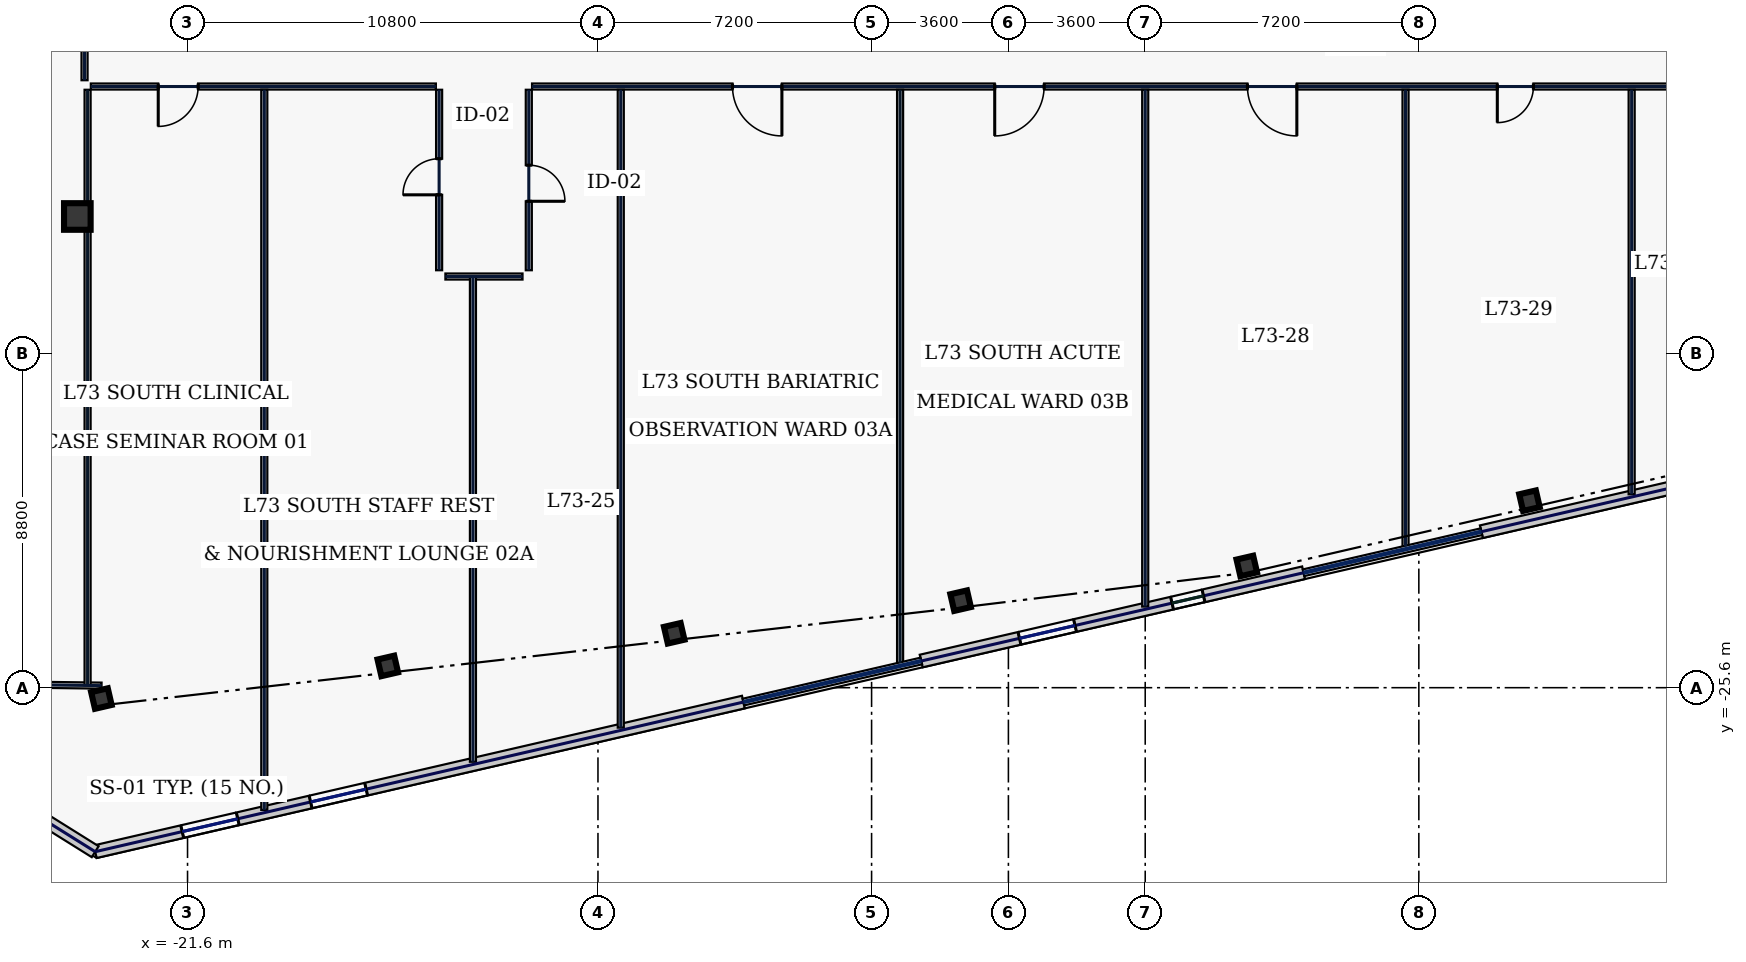
"""IFC4 building model, lengths in metres.
Left out: names, types, materials, properties, quantities, classifications, styles, units other than length and angle.
Written with IfcOpenShell. Run it as: python <this file> out.ifc"""

import sys

from ifc_helpers import new_model, si_unit, direction, frame, frame_2d, origin, origin_2d, place, context, subcontext, project, spatial, rectangle, hollow_rectangle, extrude, element, fill, save


model = new_model("IFC4")
c1 = context("Model", 3, precision=1e-05, world=origin(), true_north=direction((0.0, 1.0)))
c2 = subcontext(c1, "Body", "Model", "MODEL_VIEW")
j1 = project(units=[si_unit("LENGTHUNIT", "METRE"), si_unit("PLANEANGLEUNIT", "RADIAN")], contexts=[c1])
p1 = place(None, origin())
s1 = spatial("IfcSite", under=j1, at=p1, CompositionType="ELEMENT")
p2 = place(p1, origin())
s2 = spatial("IfcBuilding", under=s1, at=p2, CompositionType="ELEMENT")
p3 = place(p2, frame((0.0, 0.0, 313.0)))
s3 = spatial("IfcBuildingStorey", under=s2, at=p3, CompositionType="ELEMENT", Elevation=313.0)
p4 = place(p3, frame((-24.5, -13.2, 0.0), z_axis=(0.0, 0.0, 1.0), x_axis=(1.0, 0.0, 0.0)))
e1 = element("IfcColumn", 1, at=p4, inside=s3, PredefinedType="COLUMN", context=c2, shape_type="SweptSolid", body=[
    extrude(hollow_rectangle(XDim=0.7, YDim=0.7, WallThickness=0.032, at=origin_2d()), origin(), (0.0, 0.0, 1.0), 3.74),
])
for number, where, z_axis, x_axis in (
    (2, (-23.867, -25.886, 0.0), (0.0, 0.0, 1.0), (0.974, 0.225, 0.0)),
    (3, (-16.33, -25.027, 0.0), (0.0, 0.0, 1.0), (0.974, 0.225, 0.0)),
    (4, (-8.794, -24.168, 0.0), (0.0, 0.0, 1.0), (0.974, 0.225, 0.0)),
    (5, (-1.258, -23.31, 0.0), (0.0, 0.0, 1.0), (0.974, 0.225, 0.0)),
    (6, (6.273, -22.397, 0.0), (0.0, 0.0, 1.0), (0.974, 0.225, 0.0)),
    (7, (13.711, -20.68, 0.0), (0.0, 0.0, 1.0), (0.974, 0.225, 0.0)),
):
    element("IfcColumn", number, at=place(p3, frame(where, z_axis=z_axis, x_axis=x_axis)), inside=s3, PredefinedType="COLUMN", context=c2, shape_type="SweptSolid", body=[
        extrude(hollow_rectangle(XDim=0.45, YDim=0.45, WallThickness=0.022, at=origin_2d()), origin(), (0.0, 0.0, 1.0), 3.74),
    ])
p5 = place(p3, frame((-24.03, -29.916, 0.0), z_axis=(0.0, 0.0, 1.0), x_axis=(0.974370978061, 0.224947098473, 0.0)))
e8 = element("IfcWall", 8, at=p5, inside=s3, PredefinedType="STANDARD", context=c2, shape_type="SweptSolid", body=[
    extrude(rectangle(XDim=17.506, YDim=0.34, at=frame_2d((8.753, 0.0))), origin(), (0.0, 0.0, 1.0), 3.74),
])
p6 = place(p5, frame((2.35, 0.0, 0.9)))
e9 = element("IfcOpeningElement", 9, at=p6, cuts=e8, PredefinedType="OPENING", context=c2, shape_type="SweptSolid", body=[
    extrude(rectangle(XDim=1.5, YDim=2.0, at=frame_2d((0.75, 1.0))), frame((0.0, 0.18, 0.0), z_axis=(0.0, -1.0, 0.0), x_axis=(1.0, 0.0, 0.0)), (0.0, 0.0, 1.0), 0.36),
])
p7 = place(p5, frame((5.817, 0.0, 0.9)))
e10 = element("IfcOpeningElement", 10, at=p7, cuts=e8, PredefinedType="OPENING", context=c2, shape_type="SweptSolid", body=[
    extrude(rectangle(XDim=1.5, YDim=2.0, at=frame_2d((0.75, 1.0))), frame((0.0, 0.18, 0.0), z_axis=(0.0, -1.0, 0.0), x_axis=(1.0, 0.0, 0.0)), (0.0, 0.0, 1.0), 0.36),
])
p8 = place(p3, frame((-2.295, -24.898, 0.0), z_axis=(0.0, 0.0, 1.0), x_axis=(0.974370872906, 0.224947553958, 0.0)))
e11 = element("IfcWall", 11, at=p8, inside=s3, PredefinedType="STANDARD", context=c2, shape_type="SweptSolid", body=[
    extrude(rectangle(XDim=10.328, YDim=0.34, at=frame_2d((5.164, 0.0))), origin(), (0.0, 0.0, 1.0), 3.74),
])
p9 = place(p8, frame((2.655, 0.0, 0.9)))
e12 = element("IfcOpeningElement", 12, at=p9, cuts=e11, PredefinedType="OPENING", context=c2, shape_type="SweptSolid", body=[
    extrude(rectangle(XDim=1.5, YDim=2.0, at=frame_2d((0.75, 1.0))), frame((0.0, 0.18, 0.0), z_axis=(0.0, -1.0, 0.0), x_axis=(1.0, 0.0, 0.0)), (0.0, 0.0, 1.0), 0.36),
])
p10 = place(p8, frame((6.774, 0.0, 0.9)))
e13 = element("IfcOpeningElement", 13, at=p10, cuts=e11, PredefinedType="OPENING", context=c2, shape_type="SweptSolid", body=[
    extrude(rectangle(XDim=0.85, YDim=1.85, at=frame_2d((0.425, 0.925))), frame((0.0, 0.18, 0.0), z_axis=(0.0, -1.0, 0.0), x_axis=(1.0, 0.0, 0.0)), (0.0, 0.0, 1.0), 0.36),
])
p11 = place(p3, frame((12.445, -21.495, 0.0), z_axis=(0.0, 0.0, 1.0), x_axis=(0.974369392164, 0.224953967767, 0.0)))
e14 = element("IfcWall", 14, at=p11, inside=s3, PredefinedType="STANDARD", context=c2, shape_type="SweptSolid", body=[
    extrude(rectangle(XDim=17.366, YDim=0.34, at=frame_2d((8.683, 0.0))), origin(), (0.0, 0.0, 1.0), 3.74),
])
p12 = place(p11, frame((6.24, 0.0, 0.9)))
e15 = element("IfcOpeningElement", 15, at=p12, cuts=e14, PredefinedType="OPENING", context=c2, shape_type="SweptSolid", body=[
    extrude(rectangle(XDim=1.5, YDim=2.0, at=frame_2d((0.75, 1.0))), frame((0.0, 0.18, 0.0), z_axis=(0.0, -1.0, 0.0), x_axis=(1.0, 0.0, 0.0)), (0.0, 0.0, 1.0), 0.36),
])
p13 = place(p11, frame((10.363, 0.0, 0.9)))
e16 = element("IfcOpeningElement", 16, at=p13, cuts=e14, PredefinedType="OPENING", context=c2, shape_type="SweptSolid", body=[
    extrude(rectangle(XDim=0.85, YDim=1.85, at=frame_2d((0.425, 0.925))), frame((0.0, 0.18, 0.0), z_axis=(0.0, -1.0, 0.0), x_axis=(1.0, 0.0, 0.0)), (0.0, 0.0, 1.0), 0.36),
])
p14 = place(p11, frame((13.875, 0.0, 0.9)))
e17 = element("IfcOpeningElement", 17, at=p14, cuts=e14, PredefinedType="OPENING", context=c2, shape_type="SweptSolid", body=[
    extrude(rectangle(XDim=1.5, YDim=2.0, at=frame_2d((0.75, 1.0))), frame((0.0, 0.18, 0.0), z_axis=(0.0, -1.0, 0.0), x_axis=(1.0, 0.0, 0.0)), (0.0, 0.0, 1.0), 0.36),
])
p15 = place(p3, frame((-29.343, -26.596, 0.0), z_axis=(0.0, 0.0, 1.0), x_axis=(0.848037708252, -0.529935887993, 0.0)))
e18 = element("IfcWall", 18, at=p15, inside=s3, PredefinedType="STANDARD", context=c2, shape_type="SweptSolid", body=[
    extrude(rectangle(XDim=6.265, YDim=0.34, at=frame_2d((3.133, 0.0))), origin(), (0.0, 0.0, 1.0), 3.74),
])
p16 = place(p3, frame((-28.994, -25.479, 0.0), z_axis=(0.0, 0.0, 1.0), x_axis=(0.999915052546, -0.01303409726, 0.0)))
e19 = element("IfcWall", 19, at=p16, inside=s3, PredefinedType="PARTITIONING", context=c2, shape_type="SweptSolid", body=[
    extrude(rectangle(XDim=5.132, YDim=0.16, at=frame_2d((2.566, 0.0))), origin(), (0.0, 0.0, 1.0), 3.74),
])
p17 = place(p3, frame((-24.31, -9.615, 0.0), z_axis=(0.0, 0.0, 1.0), x_axis=(0.0, 1.0, 0.0)))
e20 = element("IfcWall", 20, at=p17, inside=s3, PredefinedType="PARTITIONING", context=c2, shape_type="SweptSolid", body=[
    extrude(rectangle(XDim=19.28, YDim=0.16, at=frame_2d((9.64, 0.0))), origin(), (0.0, 0.0, 1.0), 3.74),
])
p18 = place(p17, frame((1.969, 0.0, 0.0)))
e21 = element("IfcOpeningElement", 21, at=p18, cuts=e20, PredefinedType="OPENING", context=c2, shape_type="SweptSolid", body=[
    extrude(rectangle(XDim=0.95, YDim=2.2, at=frame_2d((0.475, 1.1))), frame((0.0, 0.09, 0.0), z_axis=(0.0, -1.0, 0.0), x_axis=(1.0, 0.0, 0.0)), (0.0, 0.0, 1.0), 0.18),
])
p19 = place(p17, frame((7.25, 0.0, 0.0)))
e22 = element("IfcOpeningElement", 22, at=p19, cuts=e20, PredefinedType="OPENING", context=c2, shape_type="SweptSolid", body=[
    extrude(rectangle(XDim=0.95, YDim=2.2, at=frame_2d((0.475, 1.1))), frame((0.0, 0.09, 0.0), z_axis=(0.0, -1.0, 0.0), x_axis=(1.0, 0.0, 0.0)), (0.0, 0.0, 1.0), 0.18),
])
p20 = place(p17, frame((12.45, 0.0, 0.0)))
e23 = element("IfcOpeningElement", 23, at=p20, cuts=e20, PredefinedType="OPENING", context=c2, shape_type="SweptSolid", body=[
    extrude(rectangle(XDim=0.95, YDim=2.2, at=frame_2d((0.475, 1.1))), frame((0.0, 0.09, 0.0), z_axis=(0.0, -1.0, 0.0), x_axis=(1.0, 0.0, 0.0)), (0.0, 0.0, 1.0), 0.18),
])
p21 = place(p17, frame((16.506, 0.0, 0.0)))
e24 = element("IfcOpeningElement", 24, at=p21, cuts=e20, PredefinedType="OPENING", context=c2, shape_type="SweptSolid", body=[
    extrude(rectangle(XDim=0.95, YDim=2.2, at=frame_2d((0.475, 1.1))), frame((0.0, 0.09, 0.0), z_axis=(0.0, -1.0, 0.0), x_axis=(1.0, 0.0, 0.0)), (0.0, 0.0, 1.0), 0.18),
])
p22 = place(p3, frame((24.145, -9.78, 0.0), z_axis=(0.0, 0.0, 1.0), x_axis=(-1.0, 0.0, 0.0)))
e25 = element("IfcWall", 25, at=p22, inside=s3, PredefinedType="PARTITIONING", context=c2, shape_type="SweptSolid", body=[
    extrude(rectangle(XDim=36.68, YDim=0.16, at=frame_2d((18.34, 0.0))), origin(), (0.0, 0.0, 1.0), 3.74),
])
p23 = place(p22, frame((30.105, 0.0, 0.0)))
e26 = element("IfcOpeningElement", 26, at=p23, cuts=e25, PredefinedType="OPENING", context=c2, shape_type="SweptSolid", body=[
    extrude(rectangle(XDim=1.3, YDim=2.2, at=frame_2d((0.65, 1.1))), frame((0.0, 0.09, 0.0), z_axis=(0.0, -1.0, 0.0), x_axis=(1.0, 0.0, 0.0)), (0.0, 0.0, 1.0), 0.18),
])
p24 = place(p22, frame((23.205, 0.0, 0.0)))
e27 = element("IfcOpeningElement", 27, at=p24, cuts=e25, PredefinedType="OPENING", context=c2, shape_type="SweptSolid", body=[
    extrude(rectangle(XDim=1.3, YDim=2.2, at=frame_2d((0.65, 1.1))), frame((0.0, 0.09, 0.0), z_axis=(0.0, -1.0, 0.0), x_axis=(1.0, 0.0, 0.0)), (0.0, 0.0, 1.0), 0.18),
])
p25 = place(p22, frame((16.555, 0.0, 0.0)))
e28 = element("IfcOpeningElement", 28, at=p25, cuts=e25, PredefinedType="OPENING", context=c2, shape_type="SweptSolid", body=[
    extrude(rectangle(XDim=1.3, YDim=2.2, at=frame_2d((0.65, 1.1))), frame((0.0, 0.09, 0.0), z_axis=(0.0, -1.0, 0.0), x_axis=(1.0, 0.0, 0.0)), (0.0, 0.0, 1.0), 0.18),
])
p26 = place(p22, frame((10.33, 0.0, 0.0)))
e29 = element("IfcOpeningElement", 29, at=p26, cuts=e25, PredefinedType="OPENING", context=c2, shape_type="SweptSolid", body=[
    extrude(rectangle(XDim=0.95, YDim=2.2, at=frame_2d((0.475, 1.1))), frame((0.0, 0.09, 0.0), z_axis=(0.0, -1.0, 0.0), x_axis=(1.0, 0.0, 0.0)), (0.0, 0.0, 1.0), 0.18),
])
p27 = place(p22, frame((3.634, 0.0, 0.0)))
e30 = element("IfcOpeningElement", 30, at=p27, cuts=e25, PredefinedType="OPENING", context=c2, shape_type="SweptSolid", body=[
    extrude(rectangle(XDim=0.95, YDim=2.2, at=frame_2d((0.475, 1.1))), frame((0.0, 0.09, 0.0), z_axis=(0.0, -1.0, 0.0), x_axis=(1.0, 0.0, 0.0)), (0.0, 0.0, 1.0), 0.18),
])
p28 = place(p3, frame((-12.62, -9.865, 0.0), z_axis=(0.0, 0.0, 1.0), x_axis=(0.0, -1.0, 0.0)))
e31 = element("IfcWall", 31, at=p28, inside=s3, PredefinedType="PARTITIONING", context=c2, shape_type="SweptSolid", body=[
    extrude(rectangle(XDim=4.75, YDim=0.16, at=frame_2d((2.375, 0.0))), origin(), (0.0, 0.0, 1.0), 3.74),
])
p29 = place(p28, frame((1.985, 0.0, 0.0)))
e32 = element("IfcOpeningElement", 32, at=p29, cuts=e31, PredefinedType="OPENING", context=c2, shape_type="SweptSolid", body=[
    extrude(rectangle(XDim=0.95, YDim=2.2, at=frame_2d((0.475, 1.1))), frame((0.0, 0.09, 0.0), z_axis=(0.0, -1.0, 0.0), x_axis=(1.0, 0.0, 0.0)), (0.0, 0.0, 1.0), 0.18),
])
p30 = place(p3, frame((-12.785, -14.78, 0.0), z_axis=(0.0, 0.0, 1.0), x_axis=(-1.0, 0.0, 0.0)))
e33 = element("IfcWall", 33, at=p30, inside=s3, PredefinedType="PARTITIONING", context=c2, shape_type="SweptSolid", body=[
    extrude(rectangle(XDim=2.03, YDim=0.16, at=frame_2d((1.015, 0.0))), origin(), (0.0, 0.0, 1.0), 3.74),
])
p31 = place(p3, frame((-14.98, -14.615, 0.0), z_axis=(0.0, 0.0, 1.0), x_axis=(0.0, 1.0, 0.0)))
e34 = element("IfcWall", 34, at=p31, inside=s3, PredefinedType="PARTITIONING", context=c2, shape_type="SweptSolid", body=[
    extrude(rectangle(XDim=4.75, YDim=0.16, at=frame_2d((2.375, 0.0))), origin(), (0.0, 0.0, 1.0), 3.74),
])
p32 = place(p31, frame((1.985, 0.0, 0.0)))
e35 = element("IfcOpeningElement", 35, at=p32, cuts=e34, PredefinedType="OPENING", context=c2, shape_type="SweptSolid", body=[
    extrude(rectangle(XDim=0.95, YDim=2.2, at=frame_2d((0.475, 1.1))), frame((0.0, 0.09, 0.0), z_axis=(0.0, -1.0, 0.0), x_axis=(1.0, 0.0, 0.0)), (0.0, 0.0, 1.0), 0.18),
])
p33 = place(p3, frame((-15.065, -9.78, 0.0), z_axis=(0.0, 0.0, 1.0), x_axis=(-1.0, 0.0, 0.0)))
e36 = element("IfcWall", 36, at=p33, inside=s3, PredefinedType="PARTITIONING", context=c2, shape_type="SweptSolid", body=[
    extrude(rectangle(XDim=9.08, YDim=0.16, at=frame_2d((4.54, 0.0))), origin(), (0.0, 0.0, 1.0), 3.74),
])
p34 = place(p33, frame((6.256, 0.0, 0.0)))
e37 = element("IfcOpeningElement", 37, at=p34, cuts=e36, PredefinedType="OPENING", context=c2, shape_type="SweptSolid", body=[
    extrude(rectangle(XDim=1.05, YDim=2.2, at=frame_2d((0.525, 1.1))), frame((0.0, 0.09, 0.0), z_axis=(0.0, -1.0, 0.0), x_axis=(1.0, 0.0, 0.0)), (0.0, 0.0, 1.0), 0.18),
])
p35 = place(p3, frame((-24.23, -25.536, 0.0), z_axis=(0.0, 0.0, 1.0), x_axis=(0.0, 1.0, 0.0)))
e38 = element("IfcWall", 38, at=p35, inside=s3, PredefinedType="PARTITIONING", context=c2, shape_type="SweptSolid", body=[
    extrude(rectangle(XDim=15.671, YDim=0.16, at=frame_2d((7.835, 0.0))), origin(), (0.0, 0.0, 1.0), 3.335),
])
p36 = place(p3, frame((-19.58, -28.817, 0.0), z_axis=(0.0, 0.0, 1.0), x_axis=(0.0, 1.0, 0.0)))
e39 = element("IfcWall", 39, at=p36, inside=s3, PredefinedType="PARTITIONING", context=c2, shape_type="SweptSolid", body=[
    extrude(rectangle(XDim=18.952, YDim=0.16, at=frame_2d((9.476, 0.0))), origin(), (0.0, 0.0, 1.0), 3.74),
])
p37 = place(p3, frame((-10.2, -26.652, 0.0), z_axis=(0.0, 0.0, 1.0), x_axis=(0.0, 1.0, 0.0)))
e40 = element("IfcWall", 40, at=p37, inside=s3, PredefinedType="PARTITIONING", context=c2, shape_type="SweptSolid", body=[
    extrude(rectangle(XDim=16.787, YDim=0.16, at=frame_2d((8.393, 0.0))), origin(), (0.0, 0.0, 1.0), 3.74),
])
p38 = place(p3, frame((3.6, -23.466, 0.0), z_axis=(0.0, 0.0, 1.0), x_axis=(0.0, 1.0, 0.0)))
e41 = element("IfcWall", 41, at=p38, inside=s3, PredefinedType="PARTITIONING", context=c2, shape_type="SweptSolid", body=[
    extrude(rectangle(XDim=13.601, YDim=0.16, at=frame_2d((6.8, 0.0))), origin(), (0.0, 0.0, 1.0), 3.74),
])
p39 = place(p3, frame((16.4, -20.51, 0.0), z_axis=(0.0, 0.0, 1.0), x_axis=(0.0, 1.0, 0.0)))
e42 = element("IfcWall", 42, at=p39, inside=s3, PredefinedType="PARTITIONING", context=c2, shape_type="SweptSolid", body=[
    extrude(rectangle(XDim=10.646, YDim=0.16, at=frame_2d((5.323, 0.0))), origin(), (0.0, 0.0, 1.0), 3.74),
])
p40 = place(p3, frame((-14.09, -27.55, 0.0), z_axis=(0.0, 0.0, 1.0), x_axis=(0.0, 1.0, 0.0)))
e43 = element("IfcWall", 43, at=p40, inside=s3, PredefinedType="PARTITIONING", context=c2, shape_type="SweptSolid", body=[
    extrude(rectangle(XDim=12.765, YDim=0.16, at=frame_2d((6.382, 0.0))), origin(), (0.0, 0.0, 1.0), 3.74),
])
p41 = place(p3, frame((-2.85, -24.955, 0.0), z_axis=(0.0, 0.0, 1.0), x_axis=(0.0, 1.0, 0.0)))
e44 = element("IfcWall", 44, at=p41, inside=s3, PredefinedType="PARTITIONING", context=c2, shape_type="SweptSolid", body=[
    extrude(rectangle(XDim=15.09, YDim=0.16, at=frame_2d((7.545, 0.0))), origin(), (0.0, 0.0, 1.0), 3.335),
])
p42 = place(p3, frame((10.45, -21.884, 0.0), z_axis=(0.0, 0.0, 1.0), x_axis=(0.0, 1.0, 0.0)))
e45 = element("IfcWall", 45, at=p42, inside=s3, PredefinedType="PARTITIONING", context=c2, shape_type="SweptSolid", body=[
    extrude(rectangle(XDim=12.019, YDim=0.16, at=frame_2d((6.01, 0.0))), origin(), (0.0, 0.0, 1.0), 3.74),
])
p43 = place(p6, origin())
e46 = element("IfcWindow", 46, at=p43, inside=s3, PartitioningType="SINGLE_PANEL", PredefinedType="WINDOW", context=c2, shape_type="SweptSolid", body=[
    extrude(rectangle(XDim=1.5, YDim=2.0, at=frame_2d((0.75, 1.0))), frame((0.0, 0.03, 0.0), z_axis=(0.0, -1.0, 0.0), x_axis=(1.0, 0.0, 0.0)), (0.0, 0.0, 1.0), 0.06),
])
fill(e9, e46)
p44 = place(p7, origin())
e47 = element("IfcWindow", 47, at=p44, inside=s3, PartitioningType="SINGLE_PANEL", PredefinedType="WINDOW", context=c2, shape_type="SweptSolid", body=[
    extrude(rectangle(XDim=1.5, YDim=2.0, at=frame_2d((0.75, 1.0))), frame((0.0, 0.03, 0.0), z_axis=(0.0, -1.0, 0.0), x_axis=(1.0, 0.0, 0.0)), (0.0, 0.0, 1.0), 0.06),
])
fill(e10, e47)
p45 = place(p9, origin())
e48 = element("IfcWindow", 48, at=p45, inside=s3, PartitioningType="SINGLE_PANEL", PredefinedType="WINDOW", context=c2, shape_type="SweptSolid", body=[
    extrude(rectangle(XDim=1.5, YDim=2.0, at=frame_2d((0.75, 1.0))), frame((0.0, 0.03, 0.0), z_axis=(0.0, -1.0, 0.0), x_axis=(1.0, 0.0, 0.0)), (0.0, 0.0, 1.0), 0.06),
])
fill(e12, e48)
p46 = place(p10, origin())
e49 = element("IfcWindow", 49, at=p46, inside=s3, PartitioningType="SINGLE_PANEL", PredefinedType="WINDOW", context=c2, shape_type="SweptSolid", body=[
    extrude(rectangle(XDim=0.85, YDim=1.85, at=frame_2d((0.425, 0.925))), frame((0.0, 0.03, 0.0), z_axis=(0.0, -1.0, 0.0), x_axis=(1.0, 0.0, 0.0)), (0.0, 0.0, 1.0), 0.06),
])
fill(e13, e49)
p47 = place(p34, origin())
e50 = element("IfcDoor", 50, at=p47, inside=s3, OperationType="SINGLE_SWING_RIGHT", PredefinedType="DOOR", context=c2, shape_type="SweptSolid", body=[
    extrude(rectangle(XDim=1.05, YDim=2.2, at=frame_2d((0.525, 1.1))), frame((0.0, 0.025, 0.0), z_axis=(0.0, -1.0, 0.0), x_axis=(1.0, 0.0, 0.0)), (0.0, 0.0, 1.0), 0.05),
])
fill(e37, e50)
p48 = place(p32, origin())
e51 = element("IfcDoor", 51, at=p48, inside=s3, OperationType="SINGLE_SWING_LEFT", PredefinedType="DOOR", context=c2, shape_type="SweptSolid", body=[
    extrude(rectangle(XDim=0.95, YDim=2.2, at=frame_2d((0.475, 1.1))), frame((0.0, 0.025, 0.0), z_axis=(0.0, -1.0, 0.0), x_axis=(1.0, 0.0, 0.0)), (0.0, 0.0, 1.0), 0.05),
])
fill(e35, e51)
p49 = place(p29, origin())
e52 = element("IfcDoor", 52, at=p49, inside=s3, OperationType="SINGLE_SWING_RIGHT", PredefinedType="DOOR", context=c2, shape_type="SweptSolid", body=[
    extrude(rectangle(XDim=0.95, YDim=2.2, at=frame_2d((0.475, 1.1))), frame((0.0, 0.025, 0.0), z_axis=(0.0, -1.0, 0.0), x_axis=(1.0, 0.0, 0.0)), (0.0, 0.0, 1.0), 0.05),
])
fill(e32, e52)
p50 = place(p23, origin())
e53 = element("IfcDoor", 53, at=p50, inside=s3, OperationType="SINGLE_SWING_LEFT", PredefinedType="DOOR", context=c2, shape_type="SweptSolid", body=[
    extrude(rectangle(XDim=1.3, YDim=2.2, at=frame_2d((0.65, 1.1))), frame((0.0, 0.025, 0.0), z_axis=(0.0, -1.0, 0.0), x_axis=(1.0, 0.0, 0.0)), (0.0, 0.0, 1.0), 0.05),
])
fill(e26, e53)
p51 = place(p24, origin())
e54 = element("IfcDoor", 54, at=p51, inside=s3, OperationType="SINGLE_SWING_RIGHT", PredefinedType="DOOR", context=c2, shape_type="SweptSolid", body=[
    extrude(rectangle(XDim=1.3, YDim=2.2, at=frame_2d((0.65, 1.1))), frame((0.0, 0.025, 0.0), z_axis=(0.0, -1.0, 0.0), x_axis=(1.0, 0.0, 0.0)), (0.0, 0.0, 1.0), 0.05),
])
fill(e27, e54)
p52 = place(p25, origin())
e55 = element("IfcDoor", 55, at=p52, inside=s3, OperationType="SINGLE_SWING_LEFT", PredefinedType="DOOR", context=c2, shape_type="SweptSolid", body=[
    extrude(rectangle(XDim=1.3, YDim=2.2, at=frame_2d((0.65, 1.1))), frame((0.0, 0.025, 0.0), z_axis=(0.0, -1.0, 0.0), x_axis=(1.0, 0.0, 0.0)), (0.0, 0.0, 1.0), 0.05),
])
fill(e28, e55)
p53 = place(p26, origin())
e56 = element("IfcDoor", 56, at=p53, inside=s3, OperationType="SINGLE_SWING_RIGHT", PredefinedType="DOOR", context=c2, shape_type="SweptSolid", body=[
    extrude(rectangle(XDim=0.95, YDim=2.2, at=frame_2d((0.475, 1.1))), frame((0.0, 0.025, 0.0), z_axis=(0.0, -1.0, 0.0), x_axis=(1.0, 0.0, 0.0)), (0.0, 0.0, 1.0), 0.05),
])
fill(e29, e56)
save(model, sys.argv[1])
